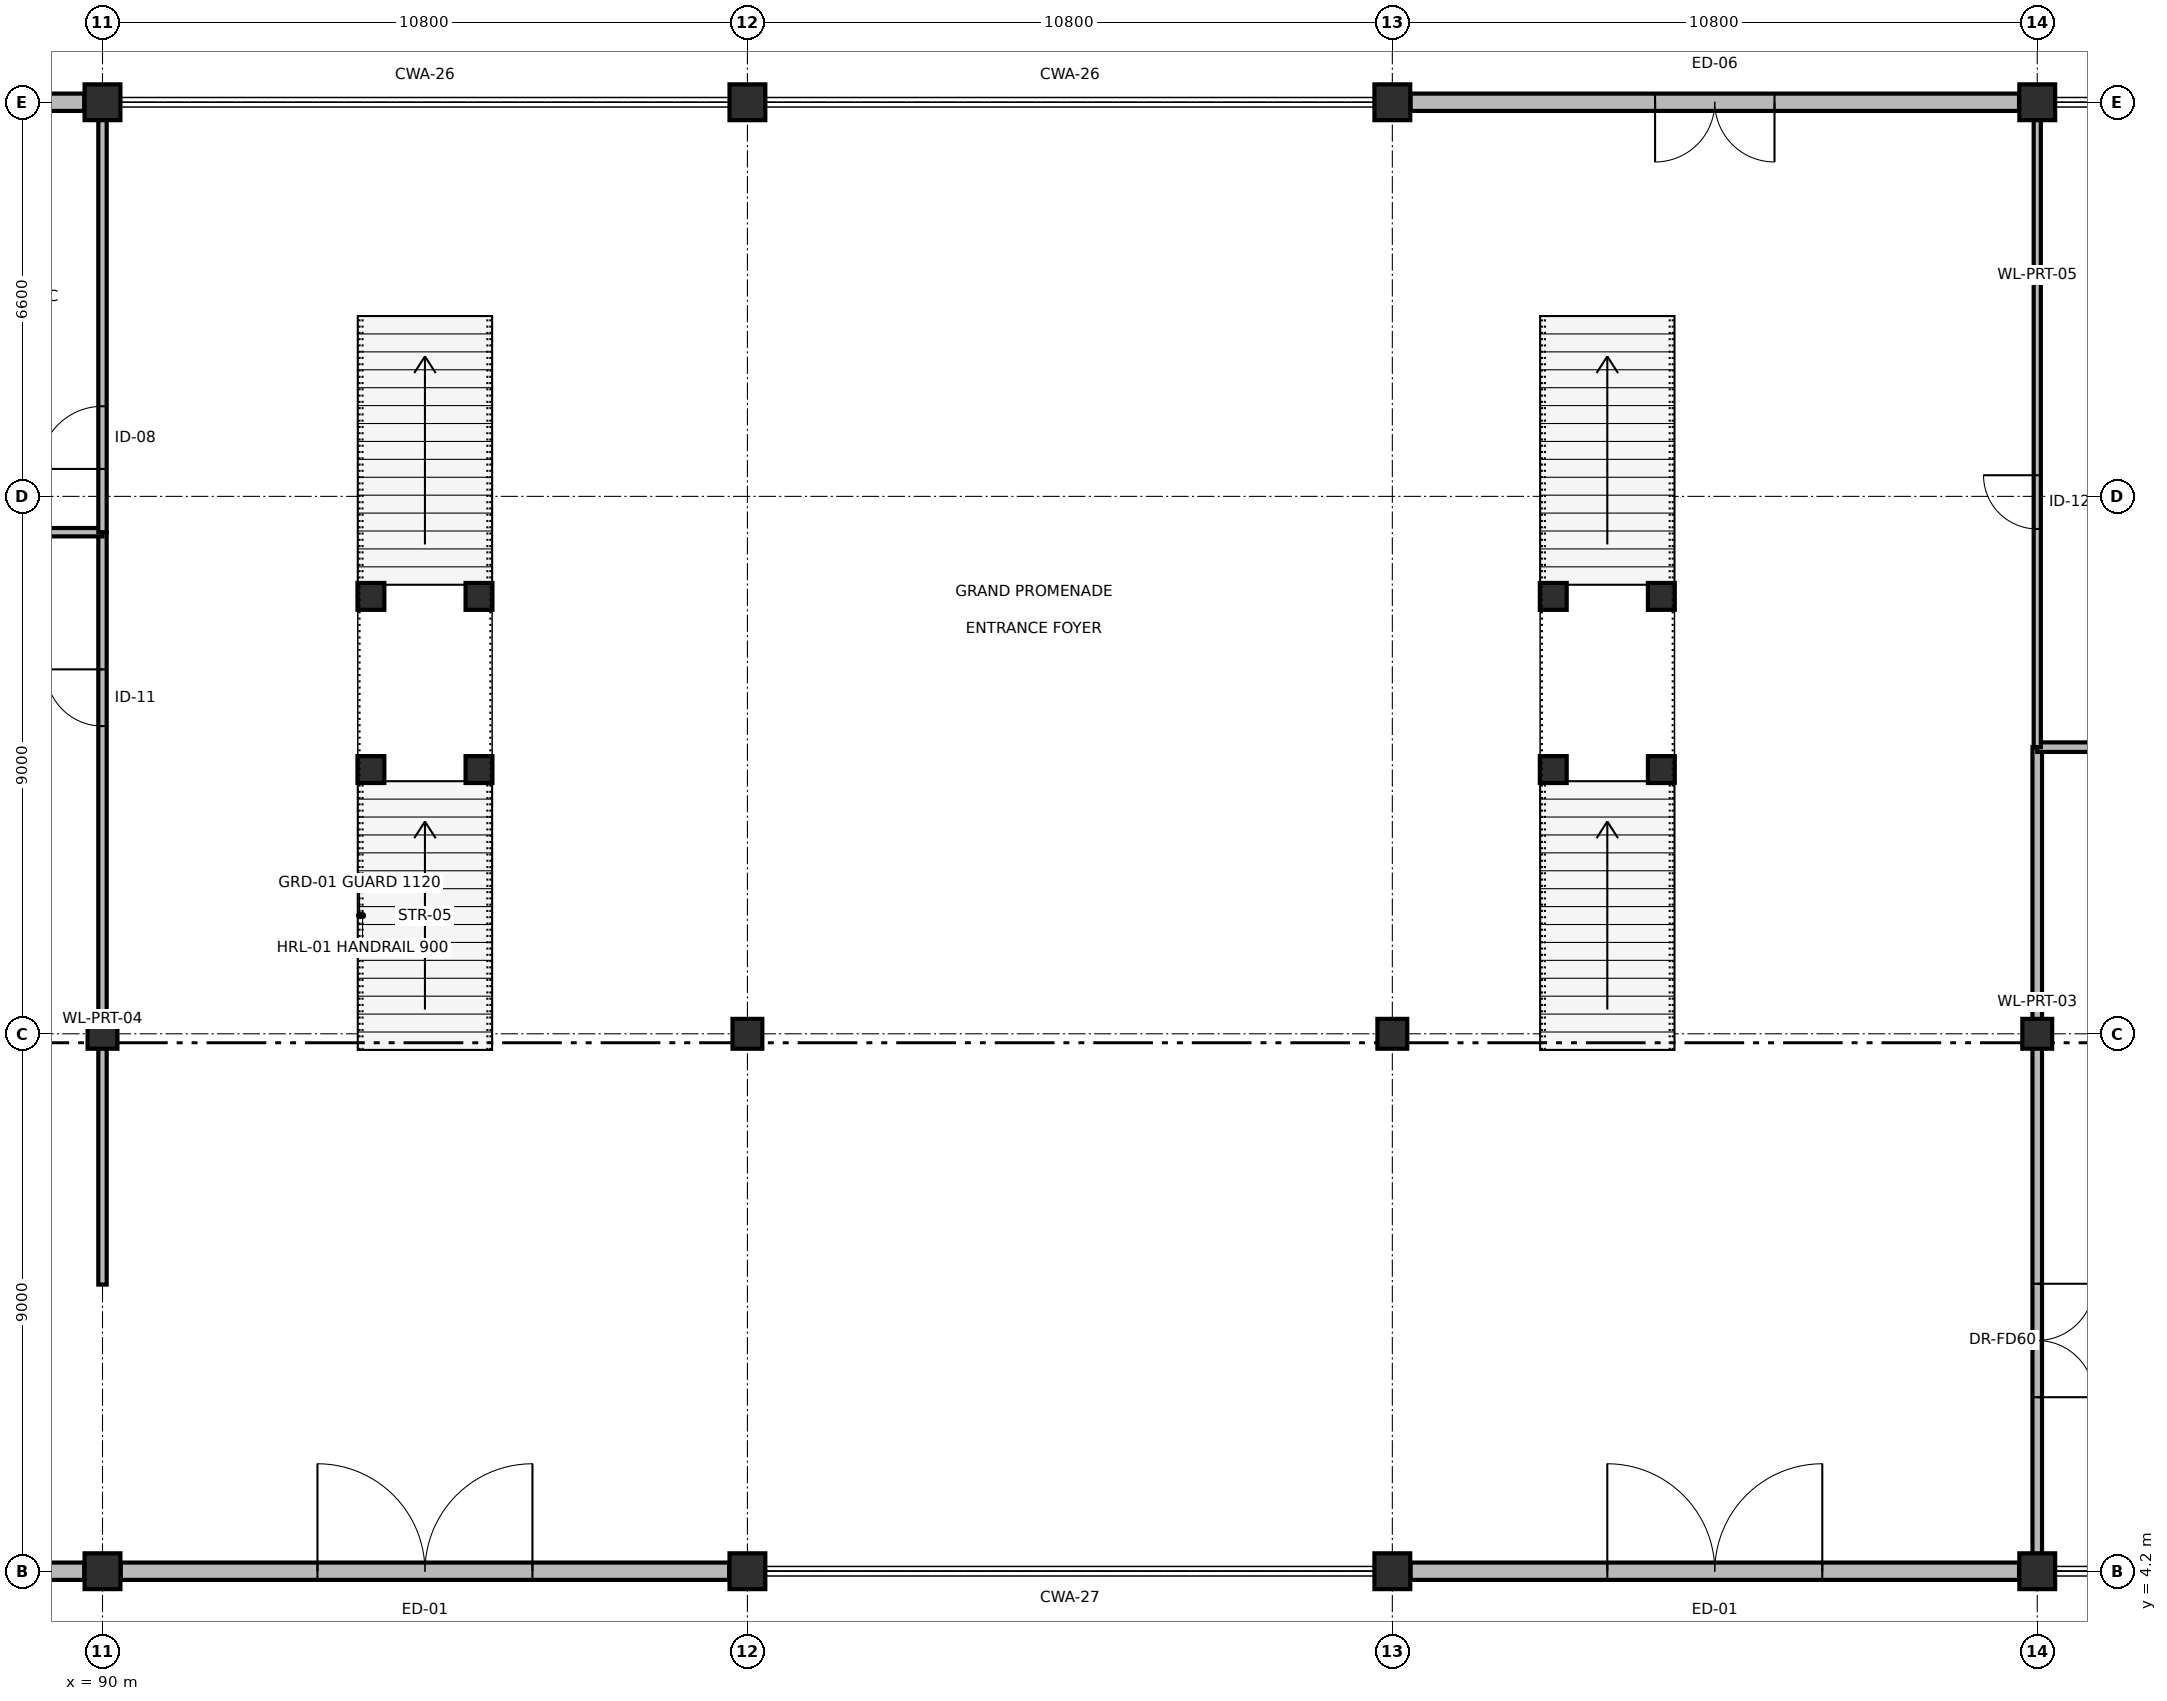
"""IFC4 building model, lengths in metres.
Left out: names, types, materials, properties, quantities, classifications, styles, units other than length and angle.
Written with IfcOpenShell. Run it as: python <this file> out.ifc"""

import sys

from ifc_helpers import new_model, si_unit, direction, frame, frame_2d, origin, origin_2d, place, context, subcontext, project, spatial, rectangle, circle, extrude, element, fill, save


model = new_model("IFC4")
c1 = context("Model", 3, precision=1e-05, world=origin(), true_north=direction((0.0, 1.0)))
c2 = subcontext(c1, "Body", "Model", "MODEL_VIEW")
j1 = project(units=[si_unit("LENGTHUNIT", "METRE"), si_unit("PLANEANGLEUNIT", "RADIAN")], contexts=[c1])
p1 = place(None, origin())
s1 = spatial("IfcSite", under=j1, at=p1, CompositionType="ELEMENT")
p2 = place(p1, origin())
s2 = spatial("IfcBuilding", under=s1, at=p2, CompositionType="ELEMENT")
p3 = place(p2, origin())
s3 = spatial("IfcBuildingStorey", under=s2, at=p3, CompositionType="ELEMENT", Elevation=0.0)
p4 = place(p3, frame((90.0, 4.2, 0.0), z_axis=(0.0, 0.0, 1.0), x_axis=(1.0, 0.0, 0.0)))
e1 = element("IfcColumn", 1, at=p4, inside=s3, PredefinedType="COLUMN", context=c2, shape_type="SweptSolid", body=[
    extrude(circle(Radius=0.3, at=origin_2d()), origin(), (0.0, 0.0, 1.0), 4.8),
])
p5 = place(p3, frame((90.0, 13.2, 0.0), z_axis=(0.0, 0.0, 1.0), x_axis=(1.0, 0.0, 0.0)))
e2 = element("IfcColumn", 2, at=p5, inside=s3, PredefinedType="COLUMN", context=c2, shape_type="SweptSolid", body=[
    extrude(rectangle(XDim=0.5, YDim=0.5, at=origin_2d()), origin(), (0.0, 0.0, 1.0), 4.8),
])
for number, where, z_axis, x_axis in (
    (3, (90.0, 28.8, 0.0), (0.0, 0.0, 1.0), (1.0, 0.0, 0.0)),
    (4, (100.8, 4.2, 0.0), (0.0, 0.0, 1.0), (1.0, 0.0, 0.0)),
):
    element("IfcColumn", number, at=place(p3, frame(where, z_axis=z_axis, x_axis=x_axis)), inside=s3, PredefinedType="COLUMN", context=c2, shape_type="SweptSolid", body=[
        extrude(circle(Radius=0.3, at=origin_2d()), origin(), (0.0, 0.0, 1.0), 4.8),
    ])
p6 = place(p3, frame((100.8, 13.2, 0.0), z_axis=(0.0, 0.0, 1.0), x_axis=(1.0, 0.0, 0.0)))
e5 = element("IfcColumn", 5, at=p6, inside=s3, PredefinedType="COLUMN", context=c2, shape_type="SweptSolid", body=[
    extrude(rectangle(XDim=0.5, YDim=0.5, at=origin_2d()), origin(), (0.0, 0.0, 1.0), 4.8),
])
for number, where, z_axis, x_axis in (
    (6, (100.8, 28.8, 0.0), (0.0, 0.0, 1.0), (1.0, 0.0, 0.0)),
    (7, (111.6, 4.2, 0.0), (0.0, 0.0, 1.0), (1.0, 0.0, 0.0)),
):
    element("IfcColumn", number, at=place(p3, frame(where, z_axis=z_axis, x_axis=x_axis)), inside=s3, PredefinedType="COLUMN", context=c2, shape_type="SweptSolid", body=[
        extrude(circle(Radius=0.3, at=origin_2d()), origin(), (0.0, 0.0, 1.0), 4.8),
    ])
p7 = place(p3, frame((111.6, 13.2, 0.0), z_axis=(0.0, 0.0, 1.0), x_axis=(1.0, 0.0, 0.0)))
e8 = element("IfcColumn", 8, at=p7, inside=s3, PredefinedType="COLUMN", context=c2, shape_type="SweptSolid", body=[
    extrude(rectangle(XDim=0.5, YDim=0.5, at=origin_2d()), origin(), (0.0, 0.0, 1.0), 4.8),
])
for number, where, z_axis, x_axis in (
    (9, (111.6, 28.8, 0.0), (0.0, 0.0, 1.0), (1.0, 0.0, 0.0)),
    (10, (122.4, 4.2, 0.0), (0.0, 0.0, 1.0), (1.0, 0.0, 0.0)),
):
    element("IfcColumn", number, at=place(p3, frame(where, z_axis=z_axis, x_axis=x_axis)), inside=s3, PredefinedType="COLUMN", context=c2, shape_type="SweptSolid", body=[
        extrude(circle(Radius=0.3, at=origin_2d()), origin(), (0.0, 0.0, 1.0), 4.8),
    ])
p8 = place(p3, frame((122.4, 13.2, 0.0), z_axis=(0.0, 0.0, 1.0), x_axis=(1.0, 0.0, 0.0)))
e11 = element("IfcColumn", 11, at=p8, inside=s3, PredefinedType="COLUMN", context=c2, shape_type="SweptSolid", body=[
    extrude(rectangle(XDim=0.5, YDim=0.5, at=origin_2d()), origin(), (0.0, 0.0, 1.0), 4.8),
])
p9 = place(p3, frame((122.4, 28.8, 0.0), z_axis=(0.0, 0.0, 1.0), x_axis=(1.0, 0.0, 0.0)))
e12 = element("IfcColumn", 12, at=p9, inside=s3, PredefinedType="COLUMN", context=c2, shape_type="SweptSolid", body=[
    extrude(circle(Radius=0.3, at=origin_2d()), origin(), (0.0, 0.0, 1.0), 4.8),
])
for number, where, z_axis, x_axis in (
    (13, (94.495, 17.625, 0.0), (0.0, 0.0, 1.0), (1.0, 0.0, 0.0)),
    (14, (94.495, 20.525, 0.0), (0.0, 0.0, 1.0), (1.0, 0.0, 0.0)),
    (15, (96.305, 17.625, 0.0), (0.0, 0.0, 1.0), (1.0, 0.0, 0.0)),
    (16, (96.305, 20.525, 0.0), (0.0, 0.0, 1.0), (1.0, 0.0, 0.0)),
    (17, (114.295, 17.625, 0.0), (0.0, 0.0, 1.0), (1.0, 0.0, 0.0)),
    (18, (114.295, 20.525, 0.0), (0.0, 0.0, 1.0), (1.0, 0.0, 0.0)),
    (19, (116.105, 17.625, 0.0), (0.0, 0.0, 1.0), (1.0, 0.0, 0.0)),
    (20, (116.105, 20.525, 0.0), (0.0, 0.0, 1.0), (1.0, 0.0, 0.0)),
):
    element("IfcColumn", number, at=place(p3, frame(where, z_axis=z_axis, x_axis=x_axis)), inside=s3, PredefinedType="COLUMN", context=c2, shape_type="SweptSolid", body=[
        extrude(rectangle(XDim=0.45, YDim=0.45, at=origin_2d()), origin(), (0.0, 0.0, 1.0), 2.24),
    ])
p10 = place(p3, frame((89.695, 4.2, 0.0), z_axis=(0.0, 0.0, 1.0), x_axis=(-1.0, 0.0, 0.0)))
e21 = element("IfcWall", 21, at=p10, inside=s3, PredefinedType="SOLIDWALL", context=c2, shape_type="SweptSolid", body=[
    extrude(rectangle(XDim=10.19, YDim=0.29, at=frame_2d((5.095, 0.0))), origin(), (0.0, 0.0, 1.0), 3.685),
])
p11 = place(p10, frame((6.4, 0.0, 0.0)))
e22 = element("IfcOpeningElement", 22, at=p11, cuts=e21, PredefinedType="OPENING", context=c2, shape_type="SweptSolid", body=[
    extrude(rectangle(XDim=1.2, YDim=2.2, at=frame_2d((0.6, 1.1))), frame((0.0, 0.155, 0.0), z_axis=(0.0, -1.0, 0.0), x_axis=(1.0, 0.0, 0.0)), (0.0, 0.0, 1.0), 0.31),
])
p12 = place(p3, frame((79.505, 28.8, 0.0), z_axis=(0.0, 0.0, 1.0), x_axis=(1.0, 0.0, 0.0)))
e23 = element("IfcWall", 23, at=p12, inside=s3, PredefinedType="SOLIDWALL", context=c2, shape_type="SweptSolid", body=[
    extrude(rectangle(XDim=10.19, YDim=0.29, at=frame_2d((5.095, 0.0))), origin(), (0.0, 0.0, 1.0), 3.685),
])
p13 = place(p12, frame((4.095, 0.0, 0.0)))
e24 = element("IfcOpeningElement", 24, at=p13, cuts=e23, PredefinedType="OPENING", context=c2, shape_type="SweptSolid", body=[
    extrude(rectangle(XDim=2.0, YDim=2.4, at=frame_2d((1.0, 1.2))), frame((0.0, 0.155, 0.0), z_axis=(0.0, -1.0, 0.0), x_axis=(1.0, 0.0, 0.0)), (0.0, 0.0, 1.0), 0.31),
])
p14 = place(p3, frame((100.495, 4.2, 0.0), z_axis=(0.0, 0.0, 1.0), x_axis=(-1.0, 0.0, 0.0)))
e25 = element("IfcWall", 25, at=p14, inside=s3, PredefinedType="SOLIDWALL", context=c2, shape_type="SweptSolid", body=[
    extrude(rectangle(XDim=10.19, YDim=0.29, at=frame_2d((5.095, 0.0))), origin(), (0.0, 0.0, 1.0), 3.685),
])
p15 = place(p14, frame((3.295, 0.0, 0.0)))
e26 = element("IfcOpeningElement", 26, at=p15, cuts=e25, PredefinedType="OPENING", context=c2, shape_type="SweptSolid", body=[
    extrude(rectangle(XDim=3.6, YDim=2.8, at=frame_2d((1.8, 1.4))), frame((0.0, 0.155, 0.0), z_axis=(0.0, -1.0, 0.0), x_axis=(1.0, 0.0, 0.0)), (0.0, 0.0, 1.0), 0.31),
])
p16 = place(p3, frame((122.095, 4.2, 0.0), z_axis=(0.0, 0.0, 1.0), x_axis=(-1.0, 0.0, 0.0)))
e27 = element("IfcWall", 27, at=p16, inside=s3, PredefinedType="SOLIDWALL", context=c2, shape_type="SweptSolid", body=[
    extrude(rectangle(XDim=10.19, YDim=0.29, at=frame_2d((5.095, 0.0))), origin(), (0.0, 0.0, 1.0), 3.685),
])
p17 = place(p16, frame((3.295, 0.0, 0.0)))
e28 = element("IfcOpeningElement", 28, at=p17, cuts=e27, PredefinedType="OPENING", context=c2, shape_type="SweptSolid", body=[
    extrude(rectangle(XDim=3.6, YDim=2.8, at=frame_2d((1.8, 1.4))), frame((0.0, 0.155, 0.0), z_axis=(0.0, -1.0, 0.0), x_axis=(1.0, 0.0, 0.0)), (0.0, 0.0, 1.0), 0.31),
])
p18 = place(p3, frame((111.905, 28.8, 0.0), z_axis=(0.0, 0.0, 1.0), x_axis=(1.0, 0.0, 0.0)))
e29 = element("IfcWall", 29, at=p18, inside=s3, PredefinedType="SOLIDWALL", context=c2, shape_type="SweptSolid", body=[
    extrude(rectangle(XDim=10.19, YDim=0.29, at=frame_2d((5.095, 0.0))), origin(), (0.0, 0.0, 1.0), 3.685),
])
p19 = place(p18, frame((4.095, 0.0, 0.0)))
e30 = element("IfcOpeningElement", 30, at=p19, cuts=e29, PredefinedType="OPENING", context=c2, shape_type="SweptSolid", body=[
    extrude(rectangle(XDim=2.0, YDim=2.4, at=frame_2d((1.0, 1.2))), frame((0.0, 0.155, 0.0), z_axis=(0.0, -1.0, 0.0), x_axis=(1.0, 0.0, 0.0)), (0.0, 0.0, 1.0), 0.31),
])
p20 = place(p3, frame((90.0, 9.0, 0.0), z_axis=(0.0, 0.0, 1.0), x_axis=(0.0, 1.0, 0.0)))
e31 = element("IfcWall", 31, at=p20, inside=s3, PredefinedType="PARTITIONING", context=c2, shape_type="SweptSolid", body=[
    extrude(rectangle(XDim=12.6, YDim=0.14, at=frame_2d((6.3, 0.0))), origin(), (0.0, 0.0, 1.0), 3.785),
])
p21 = place(p20, frame((9.353, 0.0, 0.0)))
e32 = element("IfcOpeningElement", 32, at=p21, cuts=e31, PredefinedType="OPENING", context=c2, shape_type="SweptSolid", body=[
    extrude(rectangle(XDim=0.95, YDim=2.1, at=frame_2d((0.475, 1.05))), frame((0.0, 0.08, 0.0), z_axis=(0.0, -1.0, 0.0), x_axis=(1.0, 0.0, 0.0)), (0.0, 0.0, 1.0), 0.16),
])
p22 = place(p3, frame((79.2, 21.6, 0.0), z_axis=(0.0, 0.0, 1.0), x_axis=(1.0, 0.0, 0.0)))
e33 = element("IfcWall", 33, at=p22, inside=s3, PredefinedType="PARTITIONING", context=c2, shape_type="SweptSolid", body=[
    extrude(rectangle(XDim=10.8, YDim=0.14, at=frame_2d((5.4, 0.0))), origin(), (0.0, 0.0, 1.0), 3.785),
])
p23 = place(p3, frame((90.0, 21.6, 0.0), z_axis=(0.0, 0.0, 1.0), x_axis=(0.0, 1.0, 0.0)))
e34 = element("IfcWall", 34, at=p23, inside=s3, PredefinedType="PARTITIONING", context=c2, shape_type="SweptSolid", body=[
    extrude(rectangle(XDim=7.2, YDim=0.14, at=frame_2d((3.6, 0.0))), origin(), (0.0, 0.0, 1.0), 3.685),
])
p24 = place(p23, frame((1.059, 0.0, 0.0)))
e35 = element("IfcOpeningElement", 35, at=p24, cuts=e34, PredefinedType="OPENING", context=c2, shape_type="SweptSolid", body=[
    extrude(rectangle(XDim=1.05, YDim=2.2, at=frame_2d((0.525, 1.1))), frame((0.0, 0.08, 0.0), z_axis=(0.0, -1.0, 0.0), x_axis=(1.0, 0.0, 0.0)), (0.0, 0.0, 1.0), 0.16),
])
p25 = place(p3, frame((122.4, 4.2, 0.0), z_axis=(0.0, 0.0, 1.0), x_axis=(0.0, 1.0, 0.0)))
e36 = element("IfcWall", 36, at=p25, inside=s3, PredefinedType="PARTITIONING", context=c2, shape_type="SweptSolid", body=[
    extrude(rectangle(XDim=13.8, YDim=0.16, at=frame_2d((6.9, 0.0))), origin(), (0.0, 0.0, 1.0), 3.685),
])
p26 = place(p25, frame((2.914, 0.0, 0.0)))
e37 = element("IfcOpeningElement", 37, at=p26, cuts=e36, PredefinedType="OPENING", context=c2, shape_type="SweptSolid", body=[
    extrude(rectangle(XDim=1.9, YDim=2.2, at=frame_2d((0.95, 1.1))), frame((0.0, 0.09, 0.0), z_axis=(0.0, -1.0, 0.0), x_axis=(1.0, 0.0, 0.0)), (0.0, 0.0, 1.0), 0.18),
])
p27 = place(p3, frame((122.4, 18.0, 0.0), z_axis=(0.0, 0.0, 1.0), x_axis=(1.0, 0.0, 0.0)))
e38 = element("IfcWall", 38, at=p27, inside=s3, PredefinedType="PARTITIONING", context=c2, shape_type="SweptSolid", body=[
    extrude(rectangle(XDim=13.2, YDim=0.16, at=frame_2d((6.6, 0.0))), origin(), (0.0, 0.0, 1.0), 3.785),
])
p28 = place(p3, frame((122.4, 18.0, 0.0), z_axis=(0.0, 0.0, 1.0), x_axis=(0.0, 1.0, 0.0)))
e39 = element("IfcWall", 39, at=p28, inside=s3, PredefinedType="PARTITIONING", context=c2, shape_type="SweptSolid", body=[
    extrude(rectangle(XDim=10.8, YDim=0.12, at=frame_2d((5.4, 0.0))), origin(), (0.0, 0.0, 1.0), 3.685),
])
p29 = place(p28, frame((3.654, 0.0, 0.0)))
e40 = element("IfcOpeningElement", 40, at=p29, cuts=e39, PredefinedType="OPENING", context=c2, shape_type="SweptSolid", body=[
    extrude(rectangle(XDim=0.9, YDim=2.1, at=frame_2d((0.45, 1.05))), frame((0.0, 0.07, 0.0), z_axis=(0.0, -1.0, 0.0), x_axis=(1.0, 0.0, 0.0)), (0.0, 0.0, 1.0), 0.14),
])
p30 = place(p15, origin())
e41 = element("IfcDoor", 41, at=p30, inside=s3, OperationType="DOUBLE_DOOR_SINGLE_SWING", PredefinedType="DOOR", context=c2, shape_type="SweptSolid", body=[
    extrude(rectangle(XDim=3.6, YDim=2.8, at=frame_2d((1.8, 1.4))), frame((0.0, 0.025, 0.0), z_axis=(0.0, -1.0, 0.0), x_axis=(1.0, 0.0, 0.0)), (0.0, 0.0, 1.0), 0.05),
])
fill(e26, e41)
p31 = place(p17, origin())
e42 = element("IfcDoor", 42, at=p31, inside=s3, OperationType="DOUBLE_DOOR_SINGLE_SWING", PredefinedType="DOOR", context=c2, shape_type="SweptSolid", body=[
    extrude(rectangle(XDim=3.6, YDim=2.8, at=frame_2d((1.8, 1.4))), frame((0.0, 0.025, 0.0), z_axis=(0.0, -1.0, 0.0), x_axis=(1.0, 0.0, 0.0)), (0.0, 0.0, 1.0), 0.05),
])
fill(e28, e42)
p32 = place(p19, origin())
e43 = element("IfcDoor", 43, at=p32, inside=s3, OperationType="DOUBLE_DOOR_SINGLE_SWING", PredefinedType="DOOR", context=c2, shape_type="SweptSolid", body=[
    extrude(rectangle(XDim=2.0, YDim=2.4, at=frame_2d((1.0, 1.2))), frame((0.0, 0.025, 0.0), z_axis=(0.0, -1.0, 0.0), x_axis=(1.0, 0.0, 0.0)), (0.0, 0.0, 1.0), 0.05),
])
fill(e30, e43)
p33 = place(p21, origin())
e44 = element("IfcDoor", 44, at=p33, inside=s3, OperationType="SINGLE_SWING_RIGHT", PredefinedType="DOOR", context=c2, shape_type="SweptSolid", body=[
    extrude(rectangle(XDim=0.95, YDim=2.1, at=frame_2d((0.475, 1.05))), frame((0.0, 0.025, 0.0), z_axis=(0.0, -1.0, 0.0), x_axis=(1.0, 0.0, 0.0)), (0.0, 0.0, 1.0), 0.05),
])
fill(e32, e44)
p34 = place(p24, origin())
e45 = element("IfcDoor", 45, at=p34, inside=s3, OperationType="SINGLE_SWING_LEFT", PredefinedType="DOOR", context=c2, shape_type="SweptSolid", body=[
    extrude(rectangle(XDim=1.05, YDim=2.2, at=frame_2d((0.525, 1.1))), frame((0.0, 0.025, 0.0), z_axis=(0.0, -1.0, 0.0), x_axis=(1.0, 0.0, 0.0)), (0.0, 0.0, 1.0), 0.05),
])
fill(e35, e45)
p35 = place(p26, origin())
e46 = element("IfcDoor", 46, at=p35, inside=s3, OperationType="DOUBLE_DOOR_SINGLE_SWING", PredefinedType="DOOR", context=c2, shape_type="SweptSolid", body=[
    extrude(rectangle(XDim=1.9, YDim=2.2, at=frame_2d((0.95, 1.1))), frame((0.0, 0.025, 0.0), z_axis=(0.0, -1.0, 0.0), x_axis=(1.0, 0.0, 0.0)), (0.0, 0.0, 1.0), 0.05),
])
fill(e37, e46)
p36 = place(p29, origin())
e47 = element("IfcDoor", 47, at=p36, inside=s3, OperationType="SINGLE_SWING_RIGHT", PredefinedType="DOOR", context=c2, shape_type="SweptSolid", body=[
    extrude(rectangle(XDim=0.9, YDim=2.1, at=frame_2d((0.45, 1.05))), frame((0.0, 0.025, 0.0), z_axis=(0.0, -1.0, 0.0), x_axis=(1.0, 0.0, 0.0)), (0.0, 0.0, 1.0), 0.05),
])
fill(e40, e47)
save(model, sys.argv[1])
